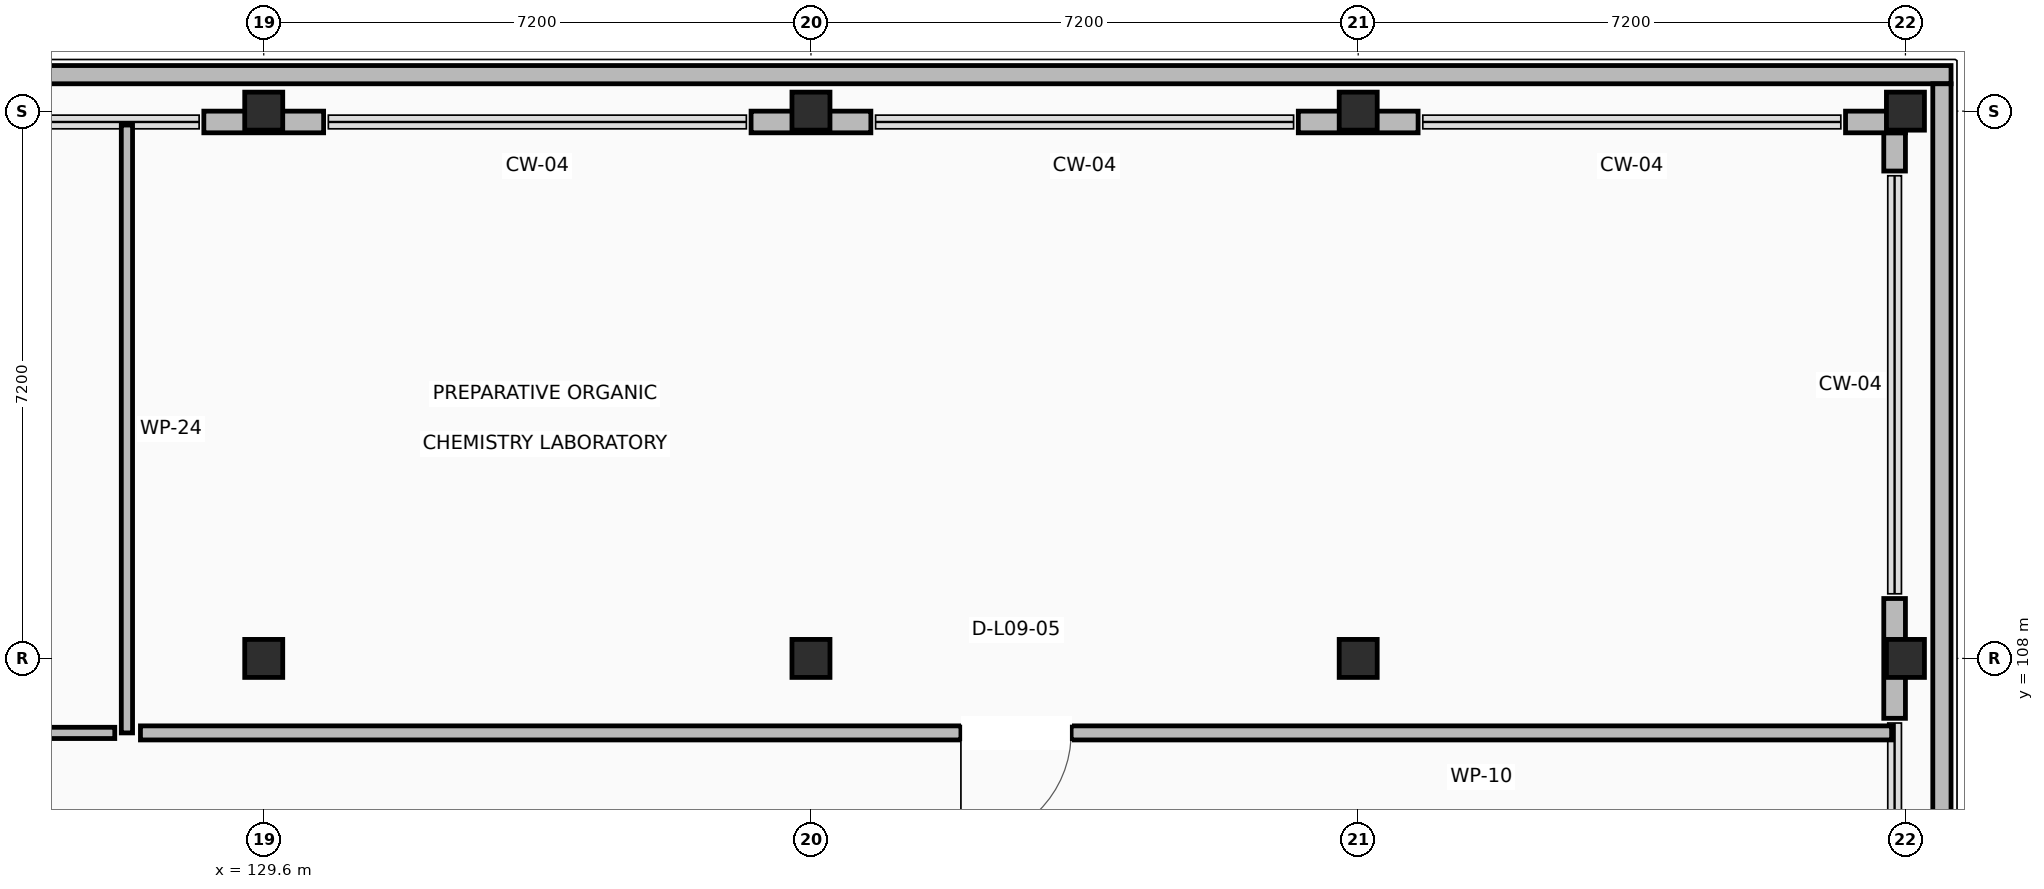
"""IFC4 building model, lengths in metres.
Left out: names, types, materials, properties, quantities, classifications, styles, units other than length and angle.
Written with IfcOpenShell. Run it as: python <this file> out.ifc"""

import sys

from ifc_helpers import new_model, si_unit, direction, frame, frame_2d, origin, origin_2d, place, context, subcontext, project, spatial, rectangle, extrude, element, fill, save


model = new_model("IFC4")
c1 = context("Model", 3, precision=1e-05, world=origin(), true_north=direction((0.0, 1.0)))
c2 = subcontext(c1, "Body", "Model", "MODEL_VIEW")
j1 = project(units=[si_unit("LENGTHUNIT", "METRE"), si_unit("PLANEANGLEUNIT", "RADIAN")], contexts=[c1])
p1 = place(None, origin())
s1 = spatial("IfcSite", under=j1, at=p1, CompositionType="ELEMENT")
p2 = place(p1, origin())
s2 = spatial("IfcBuilding", under=s1, at=p2, CompositionType="ELEMENT")
p3 = place(p2, frame((0.0, 0.0, 39.6)))
s3 = spatial("IfcBuildingStorey", under=s2, at=p3, CompositionType="ELEMENT", Elevation=39.6)
for number, where, z_axis, x_axis in (
    (1, (129.6, 108.0, 0.0), (0.0, 0.0, 1.0), (1.0, 0.0, 0.0)),
    (2, (129.6, 115.2, 0.0), (0.0, 0.0, 1.0), (1.0, 0.0, 0.0)),
    (3, (136.8, 108.0, 0.0), (0.0, 0.0, 1.0), (1.0, 0.0, 0.0)),
    (4, (136.8, 115.2, 0.0), (0.0, 0.0, 1.0), (1.0, 0.0, 0.0)),
    (5, (144.0, 108.0, 0.0), (0.0, 0.0, 1.0), (1.0, 0.0, 0.0)),
    (6, (144.0, 115.2, 0.0), (0.0, 0.0, 1.0), (1.0, 0.0, 0.0)),
    (7, (151.2, 108.0, 0.0), (0.0, 0.0, 1.0), (1.0, 0.0, 0.0)),
    (8, (151.2, 115.2, 0.0), (0.0, 0.0, 1.0), (1.0, 0.0, 0.0)),
):
    element("IfcColumn", number, at=place(p3, frame(where, z_axis=z_axis, x_axis=x_axis)), inside=s3, PredefinedType="COLUMN", context=c2, shape_type="SweptSolid", body=[
        extrude(rectangle(XDim=0.5, YDim=0.5, at=origin_2d()), origin(), (0.0, 0.0, 1.0), 3.92),
    ])
p4 = place(p3, frame((151.058, 107.212, 0.0), z_axis=(0.0, 0.0, 1.0), x_axis=(0.0, 1.0, 0.0)))
e9 = element("IfcWall", 9, at=p4, inside=s3, PredefinedType="STANDARD", context=c2, shape_type="SweptSolid", body=[
    extrude(rectangle(XDim=1.576, YDim=0.285, at=frame_2d((0.788, 0.0))), origin(), (0.0, 0.0, 1.0), 2.96),
])
p5 = place(p3, frame((151.058, 114.412, 0.0), z_axis=(0.0, 0.0, 1.0), x_axis=(0.0, 1.0, 0.0)))
e10 = element("IfcWall", 10, at=p5, inside=s3, PredefinedType="STANDARD", context=c2, shape_type="SweptSolid", body=[
    extrude(rectangle(XDim=0.503, YDim=0.285, at=frame_2d((0.251, 0.0))), origin(), (0.0, 0.0, 1.0), 2.96),
])
p6 = place(p3, frame((151.2, 115.058, 0.0), z_axis=(0.0, 0.0, 1.0), x_axis=(-1.0, 0.0, 0.0)))
e11 = element("IfcWall", 11, at=p6, inside=s3, PredefinedType="STANDARD", context=c2, shape_type="SweptSolid", body=[
    extrude(rectangle(XDim=0.788, YDim=0.285, at=frame_2d((0.394, 0.0))), origin(), (0.0, 0.0, 1.0), 2.96),
])
p7 = place(p3, frame((144.788, 115.058, 0.0), z_axis=(0.0, 0.0, 1.0), x_axis=(-1.0, 0.0, 0.0)))
e12 = element("IfcWall", 12, at=p7, inside=s3, PredefinedType="STANDARD", context=c2, shape_type="SweptSolid", body=[
    extrude(rectangle(XDim=1.576, YDim=0.285, at=frame_2d((0.788, 0.0))), origin(), (0.0, 0.0, 1.0), 2.96),
])
for number, where, z_axis, x_axis in (
    (13, (137.588, 115.058, 0.0), (0.0, 0.0, 1.0), (-1.0, 0.0, 0.0)),
    (14, (130.388, 115.058, 0.0), (0.0, 0.0, 1.0), (-1.0, 0.0, 0.0)),
):
    element("IfcWall", number, at=place(p3, frame(where, z_axis=z_axis, x_axis=x_axis)), inside=s3, PredefinedType="STANDARD", context=c2, shape_type="SweptSolid", body=[
        extrude(rectangle(XDim=1.576, YDim=0.285, at=frame_2d((0.788, 0.0))), origin(), (0.0, 0.0, 1.0), 2.96),
    ])
p8 = place(p3, frame((94.16, 115.68, 0.0), z_axis=(0.0, 0.0, 1.0), x_axis=(1.0, 0.0, 0.0)))
e15 = element("IfcWall", 15, at=p8, inside=s3, PredefinedType="PARAPET", context=c2, shape_type="SweptSolid", body=[
    extrude(rectangle(XDim=57.64, YDim=0.24, at=frame_2d((28.82, 0.0))), origin(), (0.0, 0.0, 1.0), 1.12),
])
p9 = place(p3, frame((151.68, 115.56, 0.0), z_axis=(0.0, 0.0, 1.0), x_axis=(0.0, -1.0, 0.0)))
e16 = element("IfcWall", 16, at=p9, inside=s3, PredefinedType="PARAPET", context=c2, shape_type="SweptSolid", body=[
    extrude(rectangle(XDim=21.36, YDim=0.24, at=frame_2d((10.68, 0.0))), origin(), (0.0, 0.0, 1.0), 1.12),
])
p10 = place(p3, frame((127.8, 115.017, 0.0), z_axis=(0.0, 0.0, 1.0), x_axis=(0.0, -1.0, 0.0)))
e17 = element("IfcWall", 17, at=p10, inside=s3, PredefinedType="PARTITIONING", context=c2, shape_type="SweptSolid", body=[
    extrude(rectangle(XDim=7.997, YDim=0.148, at=frame_2d((3.999, 0.0))), origin(), (0.0, 0.0, 1.0), 2.96),
])
p11 = place(p3, frame((127.64, 107.02, 0.0), z_axis=(0.0, 0.0, 1.0), x_axis=(-1.0, 0.0, 0.0)))
e18 = element("IfcWall", 18, at=p11, inside=s3, PredefinedType="PARTITIONING", context=c2, shape_type="SweptSolid", body=[
    extrude(rectangle(XDim=17.848, YDim=0.148, at=frame_2d((8.924, 0.0))), origin(), (0.0, 0.0, 1.0), 2.96),
])
p12 = place(p11, frame((8.454, 0.0, 0.0)))
e19 = element("IfcOpeningElement", 19, at=p12, cuts=e18, PredefinedType="OPENING", context=c2, shape_type="SweptSolid", body=[
    extrude(rectangle(XDim=0.94, YDim=2.1, at=frame_2d((0.47, 1.05))), frame((0.0, 0.084, 0.0), z_axis=(0.0, -1.0, 0.0), x_axis=(1.0, 0.0, 0.0)), (0.0, 0.0, 1.0), 0.168),
])
p13 = place(p3, frame((151.018, 107.02, 0.0), z_axis=(0.0, 0.0, 1.0), x_axis=(-1.0, 0.0, 0.0)))
e20 = element("IfcWall", 20, at=p13, inside=s3, PredefinedType="PARTITIONING", context=c2, shape_type="SweptSolid", body=[
    extrude(rectangle(XDim=23.04, YDim=0.185, at=frame_2d((11.52, 0.0))), origin(), (0.0, 0.0, 1.0), 2.96),
])
p14 = place(p13, frame((10.795, 0.0, 0.0)))
e21 = element("IfcOpeningElement", 21, at=p14, cuts=e20, PredefinedType="OPENING", context=c2, shape_type="SweptSolid", body=[
    extrude(rectangle(XDim=1.45, YDim=2.2, at=frame_2d((0.725, 1.1))), frame((0.0, 0.103, 0.0), z_axis=(0.0, -1.0, 0.0), x_axis=(1.0, 0.0, 0.0)), (0.0, 0.0, 1.0), 0.205),
])
p15 = place(p14, origin())
e22 = element("IfcDoor", 22, at=p15, inside=s3, OperationType="SINGLE_SWING_RIGHT", PredefinedType="DOOR", context=c2, shape_type="SweptSolid", body=[
    extrude(rectangle(XDim=1.45, YDim=2.2, at=frame_2d((0.725, 1.1))), frame((0.0, 0.025, 0.0), z_axis=(0.0, -1.0, 0.0), x_axis=(1.0, 0.0, 0.0)), (0.0, 0.0, 1.0), 0.05),
])
fill(e21, e22)
save(model, sys.argv[1])
